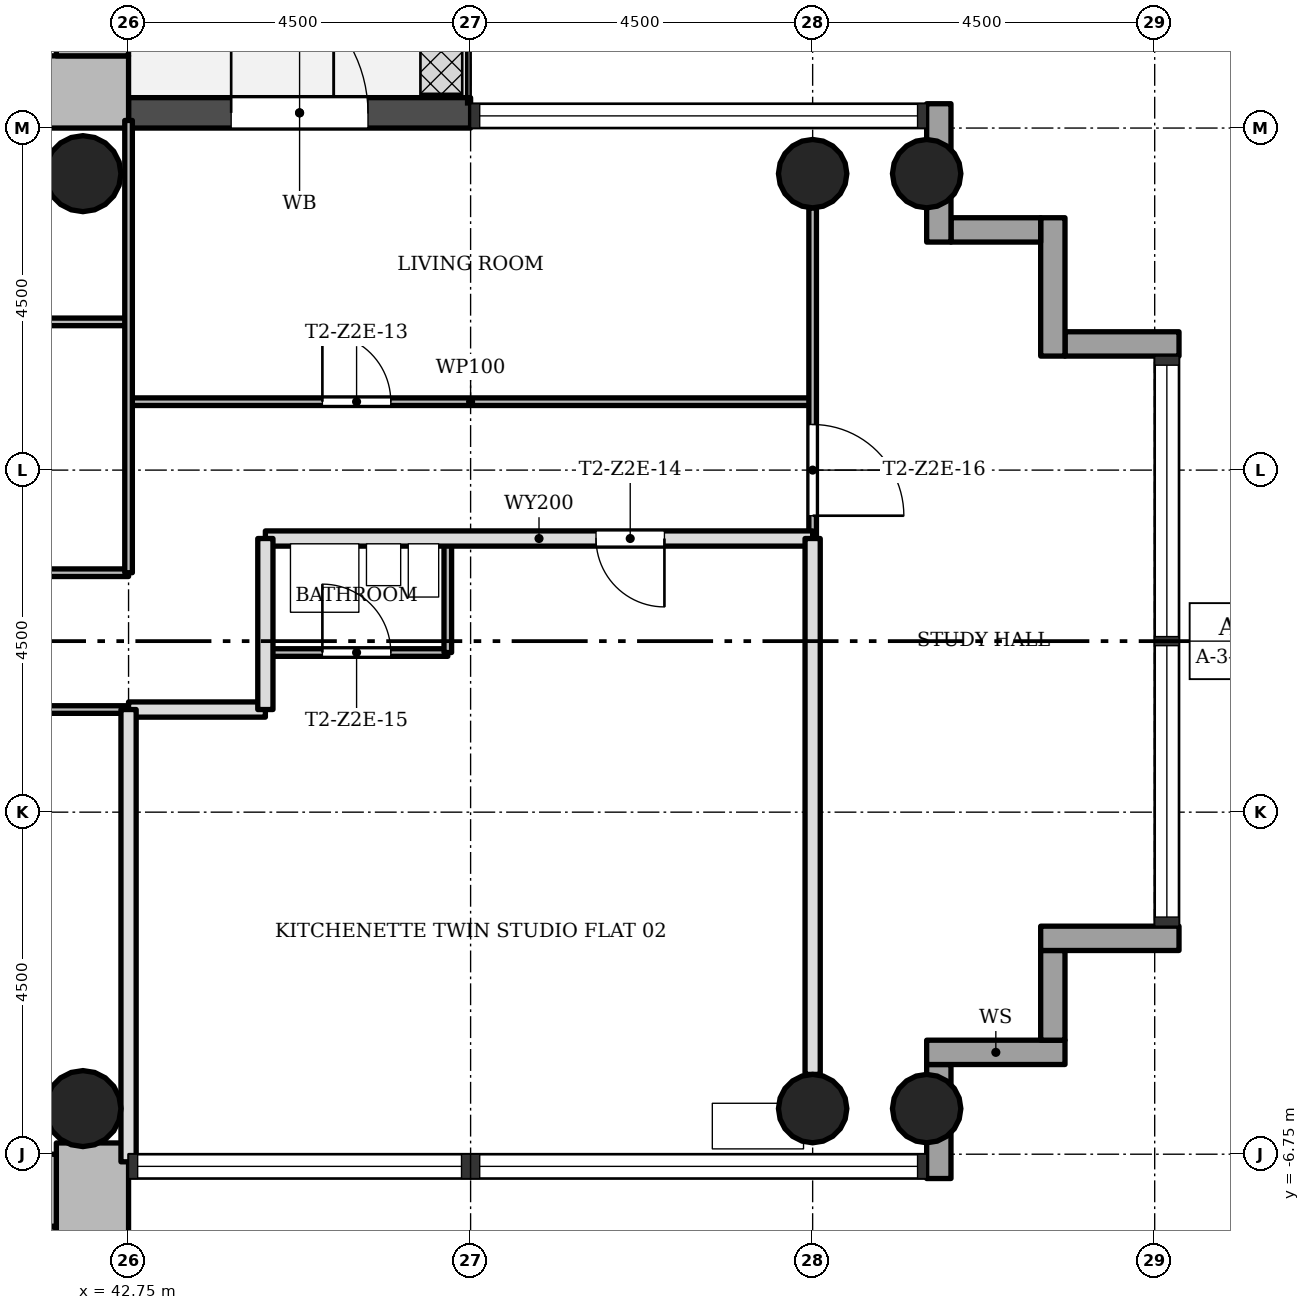
"""IFC4 building model, lengths in metres.
Left out: names, types, materials, properties, quantities, classifications, styles, units other than length and angle.
Written with IfcOpenShell. Run it as: python <this file> out.ifc"""

import sys

from ifc_helpers import new_model, si_unit, direction, frame, frame_2d, origin, origin_2d, place, context, subcontext, project, spatial, rectangle, hollow_circle, extrude, element, fill, save


model = new_model("IFC4")
c1 = context("Model", 3, precision=1e-05, world=origin(), true_north=direction((0.0, 1.0)))
c2 = subcontext(c1, "Body", "Model", "MODEL_VIEW")
j1 = project(units=[si_unit("LENGTHUNIT", "METRE"), si_unit("PLANEANGLEUNIT", "RADIAN")], contexts=[c1])
p1 = place(None, origin())
s1 = spatial("IfcSite", under=j1, at=p1, CompositionType="ELEMENT")
p2 = place(p1, origin())
s2 = spatial("IfcBuilding", under=s1, at=p2, CompositionType="ELEMENT")
p3 = place(p2, frame((0.0, 0.0, 97.0)))
s3 = spatial("IfcBuildingStorey", under=s2, at=p3, CompositionType="ELEMENT", Elevation=97.0)
p4 = place(p3, frame((30.2, 7.225, 0.0), z_axis=(0.0, 0.0, 1.0), x_axis=(1.0, 0.0, 0.0)))
e1 = element("IfcWall", 1, at=p4, inside=s3, PredefinedType="SHEAR", context=c2, shape_type="SweptSolid", body=[
    extrude(rectangle(XDim=12.55, YDim=0.95, at=frame_2d((6.275, 0.0))), origin(), (0.0, 0.0, 1.0), 3.4),
])
p5 = place(p4, frame((4.9, 0.0, 0.0)))
e2 = element("IfcOpeningElement", 2, at=p5, cuts=e1, PredefinedType="OPENING", context=c2, shape_type="SweptSolid", body=[
    extrude(rectangle(XDim=1.8, YDim=2.1, at=frame_2d((0.9, 1.05))), frame((0.0, 0.485, 0.0), z_axis=(0.0, -1.0, 0.0), x_axis=(1.0, 0.0, 0.0)), (0.0, 0.0, 1.0), 0.97),
])
p6 = place(p3, frame((42.275, 7.7, 0.0), z_axis=(0.0, 0.0, 1.0), x_axis=(0.0, 1.0, 0.0)))
e3 = element("IfcWall", 3, at=p6, inside=s3, PredefinedType="SHEAR", context=c2, shape_type="SweptSolid", body=[
    extrude(rectangle(XDim=8.05, YDim=0.95, at=frame_2d((4.025, 0.0))), origin(), (0.0, 0.0, 1.0), 3.4),
])
p7 = place(p3, frame((42.275, -14.8, 0.0), z_axis=(0.0, 0.0, 1.0), x_axis=(0.0, 1.0, 0.0)))
e4 = element("IfcWall", 4, at=p7, inside=s3, PredefinedType="SHEAR", context=c2, shape_type="SweptSolid", body=[
    extrude(rectangle(XDim=8.198, YDim=0.95, at=frame_2d((4.099, 0.0))), origin(), (0.0, 0.0, 1.0), 3.4),
])
p8 = place(p3, frame((41.8, -7.225, 0.0), z_axis=(0.0, 0.0, 1.0), x_axis=(-1.0, 0.0, 0.0)))
e5 = element("IfcWall", 5, at=p8, inside=s3, PredefinedType="SHEAR", context=c2, shape_type="SweptSolid", body=[
    extrude(rectangle(XDim=12.55, YDim=0.95, at=frame_2d((6.275, 0.0))), origin(), (0.0, 0.0, 1.0), 3.4),
])
p9 = place(p8, frame((4.9, 0.0, 0.0)))
e6 = element("IfcOpeningElement", 6, at=p9, cuts=e5, PredefinedType="OPENING", context=c2, shape_type="SweptSolid", body=[
    extrude(rectangle(XDim=1.8, YDim=2.1, at=frame_2d((0.9, 1.05))), frame((0.0, 0.485, 0.0), z_axis=(0.0, -1.0, 0.0), x_axis=(1.0, 0.0, 0.0)), (0.0, 0.0, 1.0), 0.97),
])
for number, where, z_axis, x_axis in (
    (7, (51.75, -6.15, 0.0), (0.0, 0.0, 1.0), (1.0, 0.0, 0.0)),
    (8, (51.75, 6.15, 0.0), (0.0, 0.0, 1.0), (1.0, 0.0, 0.0)),
    (9, (53.25, -6.15, 0.0), (0.0, 0.0, 1.0), (1.0, 0.0, 0.0)),
    (10, (53.25, 6.15, 0.0), (0.0, 0.0, 1.0), (1.0, 0.0, 0.0)),
):
    element("IfcColumn", number, at=place(p3, frame(where, z_axis=z_axis, x_axis=x_axis)), inside=s3, PredefinedType="COLUMN", context=c2, shape_type="SweptSolid", body=[
        extrude(hollow_circle(Radius=0.45, WallThickness=0.032, at=origin_2d()), origin(), (0.0, 0.0, 1.0), 3.4),
    ])
for number, where, z_axis, x_axis in (
    (11, (42.15, -6.15, 0.0), (0.0, 0.0, 1.0), (1.0, 0.0, 0.0)),
    (12, (42.15, 6.15, 0.0), (0.0, 0.0, 1.0), (1.0, 0.0, 0.0)),
):
    element("IfcColumn", number, at=place(p3, frame(where, z_axis=z_axis, x_axis=x_axis)), inside=s3, PredefinedType="COLUMN", context=c2, shape_type="SweptSolid", body=[
        extrude(hollow_circle(Radius=0.5, WallThickness=0.036, at=origin_2d()), origin(), (0.0, 0.0, 1.0), 3.4),
    ])
p10 = place(p3, frame((53.41, -7.07, -0.3), z_axis=(0.0, 0.0, 1.0), x_axis=(0.0, 1.0, 0.0)))
e13 = element("IfcWall", 13, at=p10, inside=s3, PredefinedType="STANDARD", context=c2, shape_type="SweptSolid", body=[
    extrude(rectangle(XDim=1.5, YDim=0.32, at=frame_2d((0.75, 0.0))), origin(), (0.0, 0.0, 1.0), 3.4),
])
p11 = place(p3, frame((53.25, -5.41, -0.3), z_axis=(0.0, 0.0, 1.0), x_axis=(1.0, 0.0, 0.0)))
e14 = element("IfcWall", 14, at=p11, inside=s3, PredefinedType="STANDARD", context=c2, shape_type="SweptSolid", body=[
    extrude(rectangle(XDim=1.82, YDim=0.32, at=frame_2d((0.91, 0.0))), origin(), (0.0, 0.0, 1.0), 3.4),
])
p12 = place(p3, frame((54.91, -5.25, -0.3), z_axis=(0.0, 0.0, 1.0), x_axis=(0.0, 1.0, 0.0)))
e15 = element("IfcWall", 15, at=p12, inside=s3, PredefinedType="STANDARD", context=c2, shape_type="SweptSolid", body=[
    extrude(rectangle(XDim=1.18, YDim=0.32, at=frame_2d((0.59, 0.0))), origin(), (0.0, 0.0, 1.0), 3.4),
])
p13 = place(p3, frame((54.75, -3.91, -0.3), z_axis=(0.0, 0.0, 1.0), x_axis=(1.0, 0.0, 0.0)))
e16 = element("IfcWall", 16, at=p13, inside=s3, PredefinedType="STANDARD", context=c2, shape_type="SweptSolid", body=[
    extrude(rectangle(XDim=1.82, YDim=0.32, at=frame_2d((0.91, 0.0))), origin(), (0.0, 0.0, 1.0), 3.4),
])
p14 = place(p3, frame((56.57, 3.91, -0.3), z_axis=(0.0, 0.0, 1.0), x_axis=(-1.0, 0.0, 0.0)))
e17 = element("IfcWall", 17, at=p14, inside=s3, PredefinedType="STANDARD", context=c2, shape_type="SweptSolid", body=[
    extrude(rectangle(XDim=1.5, YDim=0.32, at=frame_2d((0.75, 0.0))), origin(), (0.0, 0.0, 1.0), 3.4),
])
p15 = place(p3, frame((54.91, 3.75, -0.3), z_axis=(0.0, 0.0, 1.0), x_axis=(0.0, 1.0, 0.0)))
e18 = element("IfcWall", 18, at=p15, inside=s3, PredefinedType="STANDARD", context=c2, shape_type="SweptSolid", body=[
    extrude(rectangle(XDim=1.82, YDim=0.32, at=frame_2d((0.91, 0.0))), origin(), (0.0, 0.0, 1.0), 3.4),
])
p16 = place(p3, frame((54.75, 5.41, -0.3), z_axis=(0.0, 0.0, 1.0), x_axis=(-1.0, 0.0, 0.0)))
e19 = element("IfcWall", 19, at=p16, inside=s3, PredefinedType="STANDARD", context=c2, shape_type="SweptSolid", body=[
    extrude(rectangle(XDim=1.18, YDim=0.32, at=frame_2d((0.59, 0.0))), origin(), (0.0, 0.0, 1.0), 3.4),
])
p17 = place(p3, frame((53.41, 5.25, -0.3), z_axis=(0.0, 0.0, 1.0), x_axis=(0.0, 1.0, 0.0)))
e20 = element("IfcWall", 20, at=p17, inside=s3, PredefinedType="STANDARD", context=c2, shape_type="SweptSolid", body=[
    extrude(rectangle(XDim=1.82, YDim=0.32, at=frame_2d((0.91, 0.0))), origin(), (0.0, 0.0, 1.0), 3.4),
])
p18 = place(p3, frame((47.25, 6.95, -0.02), z_axis=(0.0, 0.0, 1.0), x_axis=(-1.0, 0.0, 0.0)))
e21 = element("IfcWall", 21, at=p18, inside=s3, PredefinedType="STANDARD", context=c2, shape_type="SweptSolid", body=[
    extrude(rectangle(XDim=4.5, YDim=0.4, at=frame_2d((2.25, 0.0))), origin(), (0.0, 0.0, 1.0), 3.12),
])
p19 = place(p18, frame((1.35, 0.0, 0.02)))
e22 = element("IfcOpeningElement", 22, at=p19, cuts=e21, PredefinedType="OPENING", context=c2, shape_type="SweptSolid", body=[
    extrude(rectangle(XDim=1.8, YDim=2.1, at=frame_2d((0.9, 1.05))), frame((0.0, 0.21, 0.0), z_axis=(0.0, -1.0, 0.0), x_axis=(1.0, 0.0, 0.0)), (0.0, 0.0, 1.0), 0.42),
])
p20 = place(p3, frame((42.75, -0.9, 0.0), z_axis=(0.0, 0.0, 1.0), x_axis=(-1.0, 0.0, 0.0)))
e23 = element("IfcWall", 23, at=p20, inside=s3, PredefinedType="PARTITIONING", context=c2, shape_type="SweptSolid", body=[
    extrude(rectangle(XDim=5.25, YDim=0.1, at=frame_2d((2.625, 0.0))), origin(), (0.0, 0.0, 1.0), 3.0),
])
p21 = place(p20, frame((3.6, 0.0, 0.0)))
e24 = element("IfcOpeningElement", 24, at=p21, cuts=e23, PredefinedType="OPENING", context=c2, shape_type="SweptSolid", body=[
    extrude(rectangle(XDim=0.9, YDim=2.1, at=frame_2d((0.45, 1.05))), frame((0.0, 0.06, 0.0), z_axis=(0.0, -1.0, 0.0), x_axis=(1.0, 0.0, 0.0)), (0.0, 0.0, 1.0), 0.12),
])
p22 = place(p3, frame((44.55, -0.9, 0.0), z_axis=(0.0, 0.0, 1.0), x_axis=(-1.0, 0.0, 0.0)))
e25 = element("IfcWall", 25, at=p22, inside=s3, PredefinedType="SOLIDWALL", context=c2, shape_type="SweptSolid", body=[
    extrude(rectangle(XDim=1.8, YDim=0.2, at=frame_2d((0.9, 0.0))), origin(), (0.0, 0.0, 1.0), 3.0),
])
p23 = place(p3, frame((46.95, -0.15, 0.0), z_axis=(0.0, 0.0, 1.0), x_axis=(-1.0, 0.0, 0.0)))
e26 = element("IfcWall", 26, at=p23, inside=s3, PredefinedType="PARTITIONING", context=c2, shape_type="SweptSolid", body=[
    extrude(rectangle(XDim=2.4, YDim=0.1, at=frame_2d((1.2, 0.0))), origin(), (0.0, 0.0, 1.0), 3.0),
])
p24 = place(p23, frame((0.75, 0.0, 0.0)))
e27 = element("IfcOpeningElement", 27, at=p24, cuts=e26, PredefinedType="OPENING", context=c2, shape_type="SweptSolid", body=[
    extrude(rectangle(XDim=0.9, YDim=2.1, at=frame_2d((0.45, 1.05))), frame((0.0, 0.06, 0.0), z_axis=(0.0, -1.0, 0.0), x_axis=(1.0, 0.0, 0.0)), (0.0, 0.0, 1.0), 0.12),
])
p25 = place(p3, frame((42.75, 0.9, 0.0), z_axis=(0.0, 0.0, 1.0), x_axis=(-1.0, 0.0, 0.0)))
e28 = element("IfcWall", 28, at=p25, inside=s3, PredefinedType="PARTITIONING", context=c2, shape_type="SweptSolid", body=[
    extrude(rectangle(XDim=5.25, YDim=0.1, at=frame_2d((2.625, 0.0))), origin(), (0.0, 0.0, 1.0), 3.0),
])
p26 = place(p25, frame((2.175, 0.0, 0.0)))
e29 = element("IfcOpeningElement", 29, at=p26, cuts=e28, PredefinedType="OPENING", context=c2, shape_type="SweptSolid", body=[
    extrude(rectangle(XDim=0.9, YDim=2.1, at=frame_2d((0.45, 1.05))), frame((0.0, 0.06, 0.0), z_axis=(0.0, -1.0, 0.0), x_axis=(1.0, 0.0, 0.0)), (0.0, 0.0, 1.0), 0.12),
])
p27 = place(p3, frame((51.75, 1.35, 0.0), z_axis=(0.0, 0.0, 1.0), x_axis=(-1.0, 0.0, 0.0)))
e30 = element("IfcWall", 30, at=p27, inside=s3, PredefinedType="SOLIDWALL", context=c2, shape_type="SweptSolid", body=[
    extrude(rectangle(XDim=7.2, YDim=0.2, at=frame_2d((3.6, 0.0))), origin(), (0.0, 0.0, 1.0), 3.0),
])
p28 = place(p27, frame((1.95, 0.0, 0.0)))
e31 = element("IfcOpeningElement", 31, at=p28, cuts=e30, PredefinedType="OPENING", context=c2, shape_type="SweptSolid", body=[
    extrude(rectangle(XDim=0.9, YDim=2.1, at=frame_2d((0.45, 1.05))), frame((0.0, 0.11, 0.0), z_axis=(0.0, -1.0, 0.0), x_axis=(1.0, 0.0, 0.0)), (0.0, 0.0, 1.0), 0.22),
])
p29 = place(p3, frame((51.75, 3.15, 0.0), z_axis=(0.0, 0.0, 1.0), x_axis=(-1.0, 0.0, 0.0)))
e32 = element("IfcWall", 32, at=p29, inside=s3, PredefinedType="PARTITIONING", context=c2, shape_type="SweptSolid", body=[
    extrude(rectangle(XDim=9.0, YDim=0.1, at=frame_2d((4.5, 0.0))), origin(), (0.0, 0.0, 1.0), 3.0),
])
p30 = place(p29, frame((5.55, 0.0, 0.0)))
e33 = element("IfcOpeningElement", 33, at=p30, cuts=e32, PredefinedType="OPENING", context=c2, shape_type="SweptSolid", body=[
    extrude(rectangle(XDim=0.9, YDim=2.1, at=frame_2d((0.45, 1.05))), frame((0.0, 0.06, 0.0), z_axis=(0.0, -1.0, 0.0), x_axis=(1.0, 0.0, 0.0)), (0.0, 0.0, 1.0), 0.12),
])
p31 = place(p3, frame((42.75, 4.2, 0.0), z_axis=(0.0, 0.0, 1.0), x_axis=(-1.0, 0.0, 0.0)))
e34 = element("IfcWall", 34, at=p31, inside=s3, PredefinedType="PARTITIONING", context=c2, shape_type="SweptSolid", body=[
    extrude(rectangle(XDim=5.25, YDim=0.1, at=frame_2d((2.625, 0.0))), origin(), (0.0, 0.0, 1.0), 3.0),
])
p32 = place(p3, frame((51.75, 1.35, 0.0), z_axis=(0.0, 0.0, 1.0), x_axis=(0.0, 1.0, 0.0)))
e35 = element("IfcWall", 35, at=p32, inside=s3, PredefinedType="PARTITIONING", context=c2, shape_type="SweptSolid", body=[
    extrude(rectangle(XDim=4.35, YDim=0.1, at=frame_2d((2.175, 0.0))), origin(), (0.0, 0.0, 1.0), 3.0),
])
p33 = place(p32, frame((0.3, 0.0, 0.0)))
e36 = element("IfcOpeningElement", 36, at=p33, cuts=e35, PredefinedType="OPENING", context=c2, shape_type="SweptSolid", body=[
    extrude(rectangle(XDim=1.2, YDim=2.1, at=frame_2d((0.6, 1.05))), frame((0.0, 0.06, 0.0), z_axis=(0.0, -1.0, 0.0), x_axis=(1.0, 0.0, 0.0)), (0.0, 0.0, 1.0), 0.12),
])
p34 = place(p3, frame((51.75, -5.7, 0.0), z_axis=(0.0, 0.0, 1.0), x_axis=(0.0, 1.0, 0.0)))
e37 = element("IfcWall", 37, at=p34, inside=s3, PredefinedType="SOLIDWALL", context=c2, shape_type="SweptSolid", body=[
    extrude(rectangle(XDim=7.05, YDim=0.2, at=frame_2d((3.525, 0.0))), origin(), (0.0, 0.0, 1.0), 3.0),
])
p35 = place(p3, frame((46.95, -0.15, 0.0), z_axis=(0.0, 0.0, 1.0), x_axis=(0.0, 1.0, 0.0)))
e38 = element("IfcWall", 38, at=p35, inside=s3, PredefinedType="PARTITIONING", context=c2, shape_type="SweptSolid", body=[
    extrude(rectangle(XDim=1.5, YDim=0.1, at=frame_2d((0.75, 0.0))), origin(), (0.0, 0.0, 1.0), 3.0),
])
p36 = place(p3, frame((44.55, -0.9, 0.0), z_axis=(0.0, 0.0, 1.0), x_axis=(0.0, 1.0, 0.0)))
e39 = element("IfcWall", 39, at=p36, inside=s3, PredefinedType="SOLIDWALL", context=c2, shape_type="SweptSolid", body=[
    extrude(rectangle(XDim=2.25, YDim=0.2, at=frame_2d((1.125, 0.0))), origin(), (0.0, 0.0, 1.0), 3.0),
])
p37 = place(p3, frame((42.75, 0.9, 0.0), z_axis=(0.0, 0.0, 1.0), x_axis=(0.0, 1.0, 0.0)))
e40 = element("IfcWall", 40, at=p37, inside=s3, PredefinedType="PARTITIONING", context=c2, shape_type="SweptSolid", body=[
    extrude(rectangle(XDim=5.95, YDim=0.1, at=frame_2d((2.975, 0.0))), origin(), (0.0, 0.0, 1.0), 3.0),
])
p38 = place(p3, frame((42.75, -6.85, 0.0), z_axis=(0.0, 0.0, 1.0), x_axis=(0.0, 1.0, 0.0)))
e41 = element("IfcWall", 41, at=p38, inside=s3, PredefinedType="SOLIDWALL", context=c2, shape_type="SweptSolid", body=[
    extrude(rectangle(XDim=5.95, YDim=0.2, at=frame_2d((2.975, 0.0))), origin(), (0.0, 0.0, 1.0), 3.0),
])
p39 = place(p3, frame((37.9, -7.825, 0.0), z_axis=(0.0, 0.0, 1.0), x_axis=(1.0, 0.0, 0.0)))
e42 = element("IfcWall", 42, at=p39, inside=s3, PredefinedType="SHEAR", context=c2, shape_type="SweptSolid", body=[
    extrude(rectangle(XDim=3.9, YDim=0.25, at=frame_2d((1.95, 0.0))), origin(), (0.0, 0.0, 1.0), 3.4),
])
p40 = place(p19, origin())
e43 = element("IfcDoor", 43, at=p40, inside=s3, OperationType="SINGLE_SWING_RIGHT", PredefinedType="DOOR", context=c2, shape_type="SweptSolid", body=[
    extrude(rectangle(XDim=1.8, YDim=2.1, at=frame_2d((0.9, 1.05))), frame((0.0, 0.025, 0.0), z_axis=(0.0, -1.0, 0.0), x_axis=(1.0, 0.0, 0.0)), (0.0, 0.0, 1.0), 0.05),
])
fill(e22, e43)
p41 = place(p30, origin())
e44 = element("IfcDoor", 44, at=p41, inside=s3, OperationType="SINGLE_SWING_RIGHT", PredefinedType="DOOR", context=c2, shape_type="SweptSolid", body=[
    extrude(rectangle(XDim=0.9, YDim=2.1, at=frame_2d((0.45, 1.05))), frame((0.0, 0.025, 0.0), z_axis=(0.0, -1.0, 0.0), x_axis=(1.0, 0.0, 0.0)), (0.0, 0.0, 1.0), 0.05),
])
fill(e33, e44)
p42 = place(p28, origin())
e45 = element("IfcDoor", 45, at=p42, inside=s3, OperationType="SINGLE_SWING_RIGHT", PredefinedType="DOOR", context=c2, shape_type="SweptSolid", body=[
    extrude(rectangle(XDim=0.9, YDim=2.1, at=frame_2d((0.45, 1.05))), frame((0.0, 0.025, 0.0), z_axis=(0.0, -1.0, 0.0), x_axis=(1.0, 0.0, 0.0)), (0.0, 0.0, 1.0), 0.05),
])
fill(e31, e45)
p43 = place(p24, origin())
e46 = element("IfcDoor", 46, at=p43, inside=s3, OperationType="SINGLE_SWING_RIGHT", PredefinedType="DOOR", context=c2, shape_type="SweptSolid", body=[
    extrude(rectangle(XDim=0.9, YDim=2.1, at=frame_2d((0.45, 1.05))), frame((0.0, 0.025, 0.0), z_axis=(0.0, -1.0, 0.0), x_axis=(1.0, 0.0, 0.0)), (0.0, 0.0, 1.0), 0.05),
])
fill(e27, e46)
p44 = place(p33, origin())
e47 = element("IfcDoor", 47, at=p44, inside=s3, OperationType="SINGLE_SWING_LEFT", PredefinedType="DOOR", context=c2, shape_type="SweptSolid", body=[
    extrude(rectangle(XDim=1.2, YDim=2.1, at=frame_2d((0.6, 1.05))), frame((0.0, 0.025, 0.0), z_axis=(0.0, -1.0, 0.0), x_axis=(1.0, 0.0, 0.0)), (0.0, 0.0, 1.0), 0.05),
])
fill(e36, e47)
save(model, sys.argv[1])
